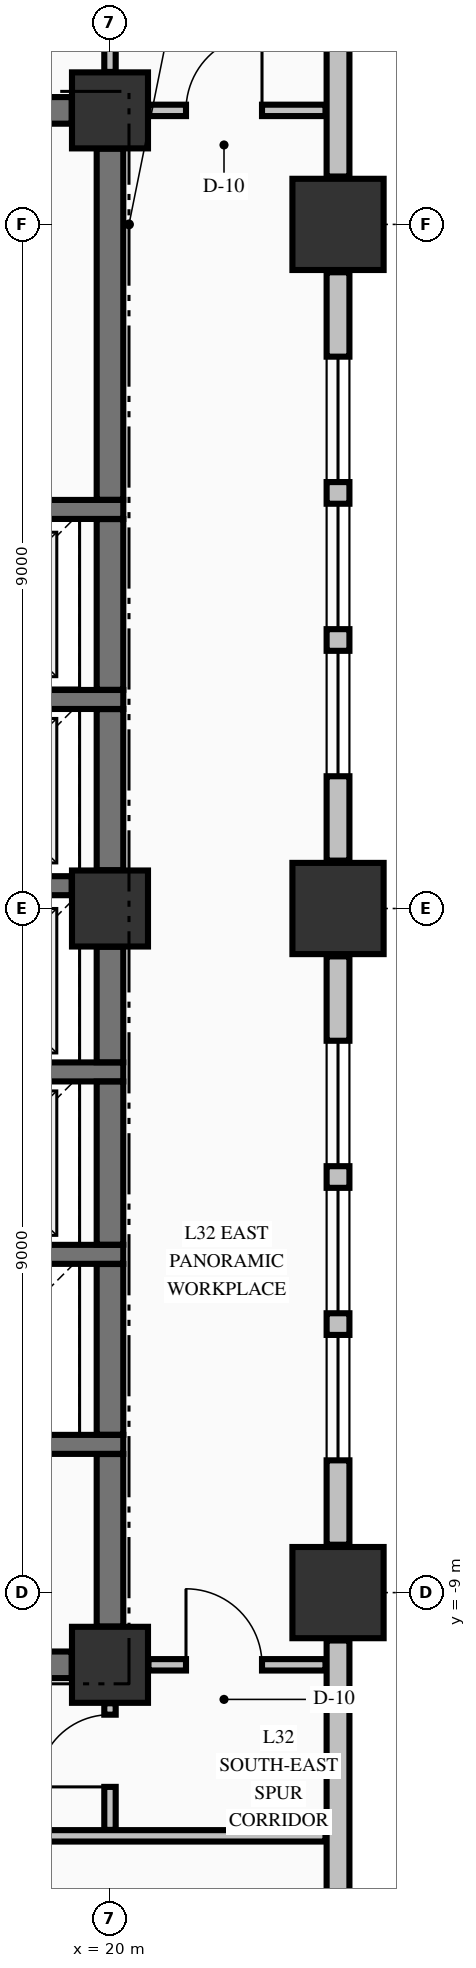
"""IFC4 building model, lengths in metres.
Left out: names, types, materials, properties, quantities, classifications, styles, units other than length and angle.
Written with IfcOpenShell. Run it as: python <this file> out.ifc"""

import sys

from ifc_helpers import new_model, si_unit, direction, frame, frame_2d, origin, origin_2d, place, context, subcontext, project, spatial, rectangle, extrude, element, fill, save


model = new_model("IFC4")
c1 = context("Model", 3, precision=1e-05, world=origin(), true_north=direction((0.0, 1.0)))
c2 = subcontext(c1, "Body", "Model", "MODEL_VIEW")
j1 = project(units=[si_unit("LENGTHUNIT", "METRE"), si_unit("PLANEANGLEUNIT", "RADIAN")], contexts=[c1])
p1 = place(None, origin())
s1 = spatial("IfcSite", under=j1, at=p1, CompositionType="ELEMENT")
p2 = place(p1, origin())
s2 = spatial("IfcBuilding", under=s1, at=p2, CompositionType="ELEMENT")
p3 = place(p2, frame((0.0, 0.0, 128.49)))
s3 = spatial("IfcBuildingStorey", under=s2, at=p3, CompositionType="ELEMENT", Elevation=128.49)
for number, where, z_axis, x_axis in (
    (1, (23.0, -9.0, -0.25), (0.0, 0.0, 1.0), (1.0, 0.0, 0.0)),
    (2, (23.0, 0.0, -0.25), (0.0, 0.0, 1.0), (1.0, 0.0, 0.0)),
    (3, (23.0, 9.0, -0.25), (0.0, 0.0, 1.0), (1.0, 0.0, 0.0)),
):
    element("IfcColumn", number, at=place(p3, frame(where, z_axis=z_axis, x_axis=x_axis)), inside=s3, PredefinedType="COLUMN", context=c2, shape_type="SweptSolid", body=[
        extrude(rectangle(XDim=1.2, YDim=1.2, at=origin_2d()), origin(), (0.0, 0.0, 1.0), 3.57),
    ])
for number, where, z_axis, x_axis in (
    (4, (20.0, -9.95, -0.25), (0.0, 0.0, 1.0), (1.0, 0.0, 0.0)),
    (5, (20.0, 10.5, -0.25), (0.0, 0.0, 1.0), (1.0, 0.0, 0.0)),
    (6, (20.0, 0.0, -0.25), (0.0, 0.0, 1.0), (1.0, 0.0, 0.0)),
):
    element("IfcColumn", number, at=place(p3, frame(where, z_axis=z_axis, x_axis=x_axis)), inside=s3, PredefinedType="COLUMN", context=c2, shape_type="SweptSolid", body=[
        extrude(rectangle(XDim=1.0, YDim=1.0, at=origin_2d()), origin(), (0.0, 0.0, 1.0), 3.57),
    ])
p4 = place(p3, frame((23.0, -20.37, 0.0), z_axis=(0.0, 0.0, 1.0), x_axis=(0.0, 1.0, 0.0)))
e7 = element("IfcWall", 7, at=p4, inside=s3, PredefinedType="STANDARD", context=c2, shape_type="SweptSolid", body=[
    extrude(rectangle(XDim=10.74, YDim=0.3, at=frame_2d((5.37, 0.0))), origin(), (0.0, 0.0, 1.0), 2.712),
])
p5 = place(p3, frame((23.0, -8.37, 0.0), z_axis=(0.0, 0.0, 1.0), x_axis=(0.0, 1.0, 0.0)))
e8 = element("IfcWall", 8, at=p5, inside=s3, PredefinedType="STANDARD", context=c2, shape_type="SweptSolid", body=[
    extrude(rectangle(XDim=7.74, YDim=0.3, at=frame_2d((3.87, 0.0))), origin(), (0.0, 0.0, 1.0), 2.712),
])
p6 = place(p5, frame((1.11, 0.0, 0.8)))
e9 = element("IfcOpeningElement", 9, at=p6, cuts=e8, PredefinedType="OPENING", context=c2, shape_type="SweptSolid", body=[
    extrude(rectangle(XDim=1.65, YDim=1.7, at=frame_2d((0.825, 0.85))), frame((0.0, 0.16, 0.0), z_axis=(0.0, -1.0, 0.0), x_axis=(1.0, 0.0, 0.0)), (0.0, 0.0, 1.0), 0.32),
])
p7 = place(p5, frame((3.045, 0.0, 0.8)))
e10 = element("IfcOpeningElement", 10, at=p7, cuts=e8, PredefinedType="OPENING", context=c2, shape_type="SweptSolid", body=[
    extrude(rectangle(XDim=1.65, YDim=1.7, at=frame_2d((0.825, 0.85))), frame((0.0, 0.16, 0.0), z_axis=(0.0, -1.0, 0.0), x_axis=(1.0, 0.0, 0.0)), (0.0, 0.0, 1.0), 0.32),
])
p8 = place(p5, frame((4.98, 0.0, 0.8)))
e11 = element("IfcOpeningElement", 11, at=p8, cuts=e8, PredefinedType="OPENING", context=c2, shape_type="SweptSolid", body=[
    extrude(rectangle(XDim=1.65, YDim=1.7, at=frame_2d((0.825, 0.85))), frame((0.0, 0.16, 0.0), z_axis=(0.0, -1.0, 0.0), x_axis=(1.0, 0.0, 0.0)), (0.0, 0.0, 1.0), 0.32),
])
p9 = place(p3, frame((23.0, 0.63, 0.0), z_axis=(0.0, 0.0, 1.0), x_axis=(0.0, 1.0, 0.0)))
e12 = element("IfcWall", 12, at=p9, inside=s3, PredefinedType="STANDARD", context=c2, shape_type="SweptSolid", body=[
    extrude(rectangle(XDim=7.74, YDim=0.3, at=frame_2d((3.87, 0.0))), origin(), (0.0, 0.0, 1.0), 2.712),
])
p10 = place(p9, frame((1.11, 0.0, 0.8)))
e13 = element("IfcOpeningElement", 13, at=p10, cuts=e12, PredefinedType="OPENING", context=c2, shape_type="SweptSolid", body=[
    extrude(rectangle(XDim=1.65, YDim=1.7, at=frame_2d((0.825, 0.85))), frame((0.0, 0.16, 0.0), z_axis=(0.0, -1.0, 0.0), x_axis=(1.0, 0.0, 0.0)), (0.0, 0.0, 1.0), 0.32),
])
p11 = place(p9, frame((3.045, 0.0, 0.8)))
e14 = element("IfcOpeningElement", 14, at=p11, cuts=e12, PredefinedType="OPENING", context=c2, shape_type="SweptSolid", body=[
    extrude(rectangle(XDim=1.65, YDim=1.7, at=frame_2d((0.825, 0.85))), frame((0.0, 0.16, 0.0), z_axis=(0.0, -1.0, 0.0), x_axis=(1.0, 0.0, 0.0)), (0.0, 0.0, 1.0), 0.32),
])
p12 = place(p9, frame((4.98, 0.0, 0.8)))
e15 = element("IfcOpeningElement", 15, at=p12, cuts=e12, PredefinedType="OPENING", context=c2, shape_type="SweptSolid", body=[
    extrude(rectangle(XDim=1.65, YDim=1.7, at=frame_2d((0.825, 0.85))), frame((0.0, 0.16, 0.0), z_axis=(0.0, -1.0, 0.0), x_axis=(1.0, 0.0, 0.0)), (0.0, 0.0, 1.0), 0.32),
])
p13 = place(p3, frame((23.0, 9.63, 0.0), z_axis=(0.0, 0.0, 1.0), x_axis=(0.0, 1.0, 0.0)))
e16 = element("IfcWall", 16, at=p13, inside=s3, PredefinedType="STANDARD", context=c2, shape_type="SweptSolid", body=[
    extrude(rectangle(XDim=10.74, YDim=0.3, at=frame_2d((5.37, 0.0))), origin(), (0.0, 0.0, 1.0), 2.712),
])
p14 = place(p3, frame((14.7, -9.95, 0.0), z_axis=(0.0, 0.0, 1.0), x_axis=(1.0, 0.0, 0.0)))
e17 = element("IfcWall", 17, at=p14, inside=s3, PredefinedType="SHEAR", context=c2, shape_type="SweptSolid", body=[
    extrude(rectangle(XDim=4.796, YDim=0.35, at=frame_2d((2.398, 0.0))), origin(), (0.0, 0.0, 1.0), 3.32),
])
p15 = place(p14, frame((0.65, 0.0, 0.0)))
e18 = element("IfcOpeningElement", 18, at=p15, cuts=e17, PredefinedType="OPENING", context=c2, shape_type="SweptSolid", body=[
    extrude(rectangle(XDim=1.2, YDim=2.15, at=frame_2d((0.6, 1.075))), frame((0.0, 0.185, 0.0), z_axis=(0.0, -1.0, 0.0), x_axis=(1.0, 0.0, 0.0)), (0.0, 0.0, 1.0), 0.37),
])
for number, where, z_axis, x_axis in (
    (19, (17.025, -7.05, 0.0), (0.0, 0.0, 1.0), (1.0, 0.0, 0.0)),
    (20, (17.025, -4.55, 0.0), (0.0, 0.0, 1.0), (1.0, 0.0, 0.0)),
    (21, (17.025, -2.15, 0.0), (0.0, 0.0, 1.0), (1.0, 0.0, 0.0)),
):
    element("IfcWall", number, at=place(p3, frame(where, z_axis=z_axis, x_axis=x_axis)), inside=s3, PredefinedType="SOLIDWALL", context=c2, shape_type="SweptSolid", body=[
        extrude(rectangle(XDim=3.15, YDim=0.25, at=frame_2d((1.575, 0.0))), origin(), (0.0, 0.0, 1.0), 3.32),
    ])
p16 = place(p3, frame((17.025, 0.3, 0.0), z_axis=(0.0, 0.0, 1.0), x_axis=(1.0, 0.0, 0.0)))
e22 = element("IfcWall", 22, at=p16, inside=s3, PredefinedType="SOLIDWALL", context=c2, shape_type="SweptSolid", body=[
    extrude(rectangle(XDim=2.471, YDim=0.25, at=frame_2d((1.236, 0.0))), origin(), (0.0, 0.0, 1.0), 3.32),
])
for number, where, z_axis, x_axis in (
    (23, (17.025, 2.75, 0.0), (0.0, 0.0, 1.0), (1.0, 0.0, 0.0)),
    (24, (17.025, 5.25, 0.0), (0.0, 0.0, 1.0), (1.0, 0.0, 0.0)),
):
    element("IfcWall", number, at=place(p3, frame(where, z_axis=z_axis, x_axis=x_axis)), inside=s3, PredefinedType="SOLIDWALL", context=c2, shape_type="SweptSolid", body=[
        extrude(rectangle(XDim=3.15, YDim=0.25, at=frame_2d((1.575, 0.0))), origin(), (0.0, 0.0, 1.0), 3.32),
    ])
p17 = place(p3, frame((14.7, 10.5, 0.0), z_axis=(0.0, 0.0, 1.0), x_axis=(1.0, 0.0, 0.0)))
e25 = element("IfcWall", 25, at=p17, inside=s3, PredefinedType="SHEAR", context=c2, shape_type="SweptSolid", body=[
    extrude(rectangle(XDim=4.796, YDim=0.35, at=frame_2d((2.398, 0.0))), origin(), (0.0, 0.0, 1.0), 3.32),
])
p18 = place(p17, frame((0.65, 0.0, 0.0)))
e26 = element("IfcOpeningElement", 26, at=p18, cuts=e25, PredefinedType="OPENING", context=c2, shape_type="SweptSolid", body=[
    extrude(rectangle(XDim=1.2, YDim=2.15, at=frame_2d((0.6, 1.075))), frame((0.0, 0.185, 0.0), z_axis=(0.0, -1.0, 0.0), x_axis=(1.0, 0.0, 0.0)), (0.0, 0.0, 1.0), 0.37),
])
p19 = place(p17, frame((3.25, 0.0, 0.0)))
e27 = element("IfcOpeningElement", 27, at=p19, cuts=e25, PredefinedType="OPENING", context=c2, shape_type="SweptSolid", body=[
    extrude(rectangle(XDim=0.9, YDim=2.15, at=frame_2d((0.45, 1.075))), frame((0.0, 0.185, 0.0), z_axis=(0.0, -1.0, 0.0), x_axis=(1.0, 0.0, 0.0)), (0.0, 0.0, 1.0), 0.37),
])
p20 = place(p3, frame((-27.835, -12.2, 0.0), z_axis=(0.0, 0.0, 1.0), x_axis=(1.0, 0.0, 0.0)))
e28 = element("IfcWall", 28, at=p20, inside=s3, PredefinedType="PARTITIONING", context=c2, shape_type="SweptSolid", body=[
    extrude(rectangle(XDim=50.67, YDim=0.15, at=frame_2d((25.335, 0.0))), origin(), (0.0, 0.0, 1.0), 3.32),
])
p21 = place(p20, frame((13.13, 0.0, 0.0)))
e29 = element("IfcOpeningElement", 29, at=p21, cuts=e28, PredefinedType="OPENING", context=c2, shape_type="SweptSolid", body=[
    extrude(rectangle(XDim=1.05, YDim=2.15, at=frame_2d((0.525, 1.075))), frame((0.0, 0.085, 0.0), z_axis=(0.0, -1.0, 0.0), x_axis=(1.0, 0.0, 0.0)), (0.0, 0.0, 1.0), 0.17),
])
p22 = place(p20, frame((24.26, 0.0, 0.0)))
e30 = element("IfcOpeningElement", 30, at=p22, cuts=e28, PredefinedType="OPENING", context=c2, shape_type="SweptSolid", body=[
    extrude(rectangle(XDim=1.05, YDim=2.15, at=frame_2d((0.525, 1.075))), frame((0.0, 0.085, 0.0), z_axis=(0.0, -1.0, 0.0), x_axis=(1.0, 0.0, 0.0)), (0.0, 0.0, 1.0), 0.17),
])
p23 = place(p20, frame((44.16, 0.0, 0.0)))
e31 = element("IfcOpeningElement", 31, at=p23, cuts=e28, PredefinedType="OPENING", context=c2, shape_type="SweptSolid", body=[
    extrude(rectangle(XDim=1.05, YDim=2.15, at=frame_2d((0.525, 1.075))), frame((0.0, 0.085, 0.0), z_axis=(0.0, -1.0, 0.0), x_axis=(1.0, 0.0, 0.0)), (0.0, 0.0, 1.0), 0.17),
])
p24 = place(p3, frame((20.506, -9.95, 0.0), z_axis=(0.0, 0.0, 1.0), x_axis=(1.0, 0.0, 0.0)))
e32 = element("IfcWall", 32, at=p24, inside=s3, PredefinedType="PARTITIONING", context=c2, shape_type="SweptSolid", body=[
    extrude(rectangle(XDim=2.329, YDim=0.15, at=frame_2d((1.165, 0.0))), origin(), (0.0, 0.0, 1.0), 3.32),
])
p25 = place(p24, frame((0.494, 0.0, 0.0)))
e33 = element("IfcOpeningElement", 33, at=p25, cuts=e32, PredefinedType="OPENING", context=c2, shape_type="SweptSolid", body=[
    extrude(rectangle(XDim=1.0, YDim=2.15, at=frame_2d((0.5, 1.075))), frame((0.0, 0.085, 0.0), z_axis=(0.0, -1.0, 0.0), x_axis=(1.0, 0.0, 0.0)), (0.0, 0.0, 1.0), 0.17),
])
p26 = place(p3, frame((20.506, 10.5, 0.0), z_axis=(0.0, 0.0, 1.0), x_axis=(1.0, 0.0, 0.0)))
e34 = element("IfcWall", 34, at=p26, inside=s3, PredefinedType="PARTITIONING", context=c2, shape_type="SweptSolid", body=[
    extrude(rectangle(XDim=2.329, YDim=0.15, at=frame_2d((1.165, 0.0))), origin(), (0.0, 0.0, 1.0), 3.32),
])
p27 = place(p26, frame((0.494, 0.0, 0.0)))
e35 = element("IfcOpeningElement", 35, at=p27, cuts=e34, PredefinedType="OPENING", context=c2, shape_type="SweptSolid", body=[
    extrude(rectangle(XDim=1.0, YDim=2.15, at=frame_2d((0.5, 1.075))), frame((0.0, 0.085, 0.0), z_axis=(0.0, -1.0, 0.0), x_axis=(1.0, 0.0, 0.0)), (0.0, 0.0, 1.0), 0.17),
])
p28 = place(p3, frame((20.0, -9.446, 0.0), z_axis=(0.0, 0.0, 1.0), x_axis=(0.0, 1.0, 0.0)))
e36 = element("IfcWall", 36, at=p28, inside=s3, PredefinedType="SHEAR", context=c2, shape_type="SweptSolid", body=[
    extrude(rectangle(XDim=2.269, YDim=0.35, at=frame_2d((1.135, 0.0))), origin(), (0.0, 0.0, 1.0), 3.32),
])
p29 = place(p3, frame((20.0, -6.923, 0.0), z_axis=(0.0, 0.0, 1.0), x_axis=(0.0, 1.0, 0.0)))
e37 = element("IfcWall", 37, at=p29, inside=s3, PredefinedType="SHEAR", context=c2, shape_type="SweptSolid", body=[
    extrude(rectangle(XDim=2.246, YDim=0.35, at=frame_2d((1.123, 0.0))), origin(), (0.0, 0.0, 1.0), 3.32),
])
p30 = place(p3, frame((20.0, -4.423, 0.0), z_axis=(0.0, 0.0, 1.0), x_axis=(0.0, 1.0, 0.0)))
e38 = element("IfcWall", 38, at=p30, inside=s3, PredefinedType="SHEAR", context=c2, shape_type="SweptSolid", body=[
    extrude(rectangle(XDim=2.146, YDim=0.35, at=frame_2d((1.073, 0.0))), origin(), (0.0, 0.0, 1.0), 3.32),
])
p31 = place(p3, frame((20.0, -2.023, 0.0), z_axis=(0.0, 0.0, 1.0), x_axis=(0.0, 1.0, 0.0)))
e39 = element("IfcWall", 39, at=p31, inside=s3, PredefinedType="SHEAR", context=c2, shape_type="SweptSolid", body=[
    extrude(rectangle(XDim=1.519, YDim=0.35, at=frame_2d((0.76, 0.0))), origin(), (0.0, 0.0, 1.0), 3.32),
])
p32 = place(p3, frame((20.0, 0.504, 0.0), z_axis=(0.0, 0.0, 1.0), x_axis=(0.0, 1.0, 0.0)))
e40 = element("IfcWall", 40, at=p32, inside=s3, PredefinedType="SHEAR", context=c2, shape_type="SweptSolid", body=[
    extrude(rectangle(XDim=2.119, YDim=0.35, at=frame_2d((1.06, 0.0))), origin(), (0.0, 0.0, 1.0), 3.32),
])
p33 = place(p3, frame((20.0, 2.877, 0.0), z_axis=(0.0, 0.0, 1.0), x_axis=(0.0, 1.0, 0.0)))
e41 = element("IfcWall", 41, at=p33, inside=s3, PredefinedType="SHEAR", context=c2, shape_type="SweptSolid", body=[
    extrude(rectangle(XDim=2.246, YDim=0.35, at=frame_2d((1.123, 0.0))), origin(), (0.0, 0.0, 1.0), 3.32),
])
p34 = place(p3, frame((20.0, 5.377, 0.0), z_axis=(0.0, 0.0, 1.0), x_axis=(0.0, 1.0, 0.0)))
e42 = element("IfcWall", 42, at=p34, inside=s3, PredefinedType="SHEAR", context=c2, shape_type="SweptSolid", body=[
    extrude(rectangle(XDim=4.619, YDim=0.35, at=frame_2d((2.31, 0.0))), origin(), (0.0, 0.0, 1.0), 3.32),
])
p35 = place(p3, frame((20.0, -12.122, 0.0), z_axis=(0.0, 0.0, 1.0), x_axis=(0.0, 1.0, 0.0)))
e43 = element("IfcWall", 43, at=p35, inside=s3, PredefinedType="PARTITIONING", context=c2, shape_type="SweptSolid", body=[
    extrude(rectangle(XDim=1.666, YDim=0.15, at=frame_2d((0.833, 0.0))), origin(), (0.0, 0.0, 1.0), 2.81),
])
p36 = place(p35, frame((0.566, 0.0, 0.0)))
e44 = element("IfcOpeningElement", 44, at=p36, cuts=e43, PredefinedType="OPENING", context=c2, shape_type="SweptSolid", body=[
    extrude(rectangle(XDim=0.95, YDim=2.15, at=frame_2d((0.475, 1.075))), frame((0.0, 0.085, 0.0), z_axis=(0.0, -1.0, 0.0), x_axis=(1.0, 0.0, 0.0)), (0.0, 0.0, 1.0), 0.17),
])
p37 = place(p3, frame((20.0, 11.006, 0.0), z_axis=(0.0, 0.0, 1.0), x_axis=(0.0, 1.0, 0.0)))
e45 = element("IfcWall", 45, at=p37, inside=s3, PredefinedType="PARTITIONING", context=c2, shape_type="SweptSolid", body=[
    extrude(rectangle(XDim=2.466, YDim=0.15, at=frame_2d((1.233, 0.0))), origin(), (0.0, 0.0, 1.0), 2.81),
])
p38 = place(p37, frame((0.549, 0.0, 0.0)))
e46 = element("IfcOpeningElement", 46, at=p38, cuts=e45, PredefinedType="OPENING", context=c2, shape_type="SweptSolid", body=[
    extrude(rectangle(XDim=0.95, YDim=2.15, at=frame_2d((0.475, 1.075))), frame((0.0, 0.085, 0.0), z_axis=(0.0, -1.0, 0.0), x_axis=(1.0, 0.0, 0.0)), (0.0, 0.0, 1.0), 0.17),
])
p39 = place(p6, origin())
e47 = element("IfcWindow", 47, at=p39, inside=s3, PartitioningType="SINGLE_PANEL", PredefinedType="WINDOW", context=c2, shape_type="SweptSolid", body=[
    extrude(rectangle(XDim=1.65, YDim=1.7, at=frame_2d((0.825, 0.85))), frame((0.0, 0.03, 0.0), z_axis=(0.0, -1.0, 0.0), x_axis=(1.0, 0.0, 0.0)), (0.0, 0.0, 1.0), 0.06),
])
fill(e9, e47)
p40 = place(p7, origin())
e48 = element("IfcWindow", 48, at=p40, inside=s3, PartitioningType="SINGLE_PANEL", PredefinedType="WINDOW", context=c2, shape_type="SweptSolid", body=[
    extrude(rectangle(XDim=1.65, YDim=1.7, at=frame_2d((0.825, 0.85))), frame((0.0, 0.03, 0.0), z_axis=(0.0, -1.0, 0.0), x_axis=(1.0, 0.0, 0.0)), (0.0, 0.0, 1.0), 0.06),
])
fill(e10, e48)
p41 = place(p8, origin())
e49 = element("IfcWindow", 49, at=p41, inside=s3, PartitioningType="SINGLE_PANEL", PredefinedType="WINDOW", context=c2, shape_type="SweptSolid", body=[
    extrude(rectangle(XDim=1.65, YDim=1.7, at=frame_2d((0.825, 0.85))), frame((0.0, 0.03, 0.0), z_axis=(0.0, -1.0, 0.0), x_axis=(1.0, 0.0, 0.0)), (0.0, 0.0, 1.0), 0.06),
])
fill(e11, e49)
p42 = place(p10, origin())
e50 = element("IfcWindow", 50, at=p42, inside=s3, PartitioningType="SINGLE_PANEL", PredefinedType="WINDOW", context=c2, shape_type="SweptSolid", body=[
    extrude(rectangle(XDim=1.65, YDim=1.7, at=frame_2d((0.825, 0.85))), frame((0.0, 0.03, 0.0), z_axis=(0.0, -1.0, 0.0), x_axis=(1.0, 0.0, 0.0)), (0.0, 0.0, 1.0), 0.06),
])
fill(e13, e50)
p43 = place(p11, origin())
e51 = element("IfcWindow", 51, at=p43, inside=s3, PartitioningType="SINGLE_PANEL", PredefinedType="WINDOW", context=c2, shape_type="SweptSolid", body=[
    extrude(rectangle(XDim=1.65, YDim=1.7, at=frame_2d((0.825, 0.85))), frame((0.0, 0.03, 0.0), z_axis=(0.0, -1.0, 0.0), x_axis=(1.0, 0.0, 0.0)), (0.0, 0.0, 1.0), 0.06),
])
fill(e14, e51)
p44 = place(p12, origin())
e52 = element("IfcWindow", 52, at=p44, inside=s3, PartitioningType="SINGLE_PANEL", PredefinedType="WINDOW", context=c2, shape_type="SweptSolid", body=[
    extrude(rectangle(XDim=1.65, YDim=1.7, at=frame_2d((0.825, 0.85))), frame((0.0, 0.03, 0.0), z_axis=(0.0, -1.0, 0.0), x_axis=(1.0, 0.0, 0.0)), (0.0, 0.0, 1.0), 0.06),
])
fill(e15, e52)
p45 = place(p36, origin())
e53 = element("IfcDoor", 53, at=p45, inside=s3, OperationType="SINGLE_SWING_LEFT", PredefinedType="DOOR", context=c2, shape_type="SweptSolid", body=[
    extrude(rectangle(XDim=0.95, YDim=2.15, at=frame_2d((0.475, 1.075))), frame((0.0, 0.025, 0.0), z_axis=(0.0, -1.0, 0.0), x_axis=(1.0, 0.0, 0.0)), (0.0, 0.0, 1.0), 0.05),
])
fill(e44, e53)
p46 = place(p27, origin())
e54 = element("IfcDoor", 54, at=p46, inside=s3, OperationType="SINGLE_SWING_RIGHT", PredefinedType="DOOR", context=c2, shape_type="SweptSolid", body=[
    extrude(rectangle(XDim=1.0, YDim=2.15, at=frame_2d((0.5, 1.075))), frame((0.0, 0.025, 0.0), z_axis=(0.0, -1.0, 0.0), x_axis=(1.0, 0.0, 0.0)), (0.0, 0.0, 1.0), 0.05),
])
fill(e35, e54)
p47 = place(p25, origin())
e55 = element("IfcDoor", 55, at=p47, inside=s3, OperationType="SINGLE_SWING_LEFT", PredefinedType="DOOR", context=c2, shape_type="SweptSolid", body=[
    extrude(rectangle(XDim=1.0, YDim=2.15, at=frame_2d((0.5, 1.075))), frame((0.0, 0.025, 0.0), z_axis=(0.0, -1.0, 0.0), x_axis=(1.0, 0.0, 0.0)), (0.0, 0.0, 1.0), 0.05),
])
fill(e33, e55)
save(model, sys.argv[1])
